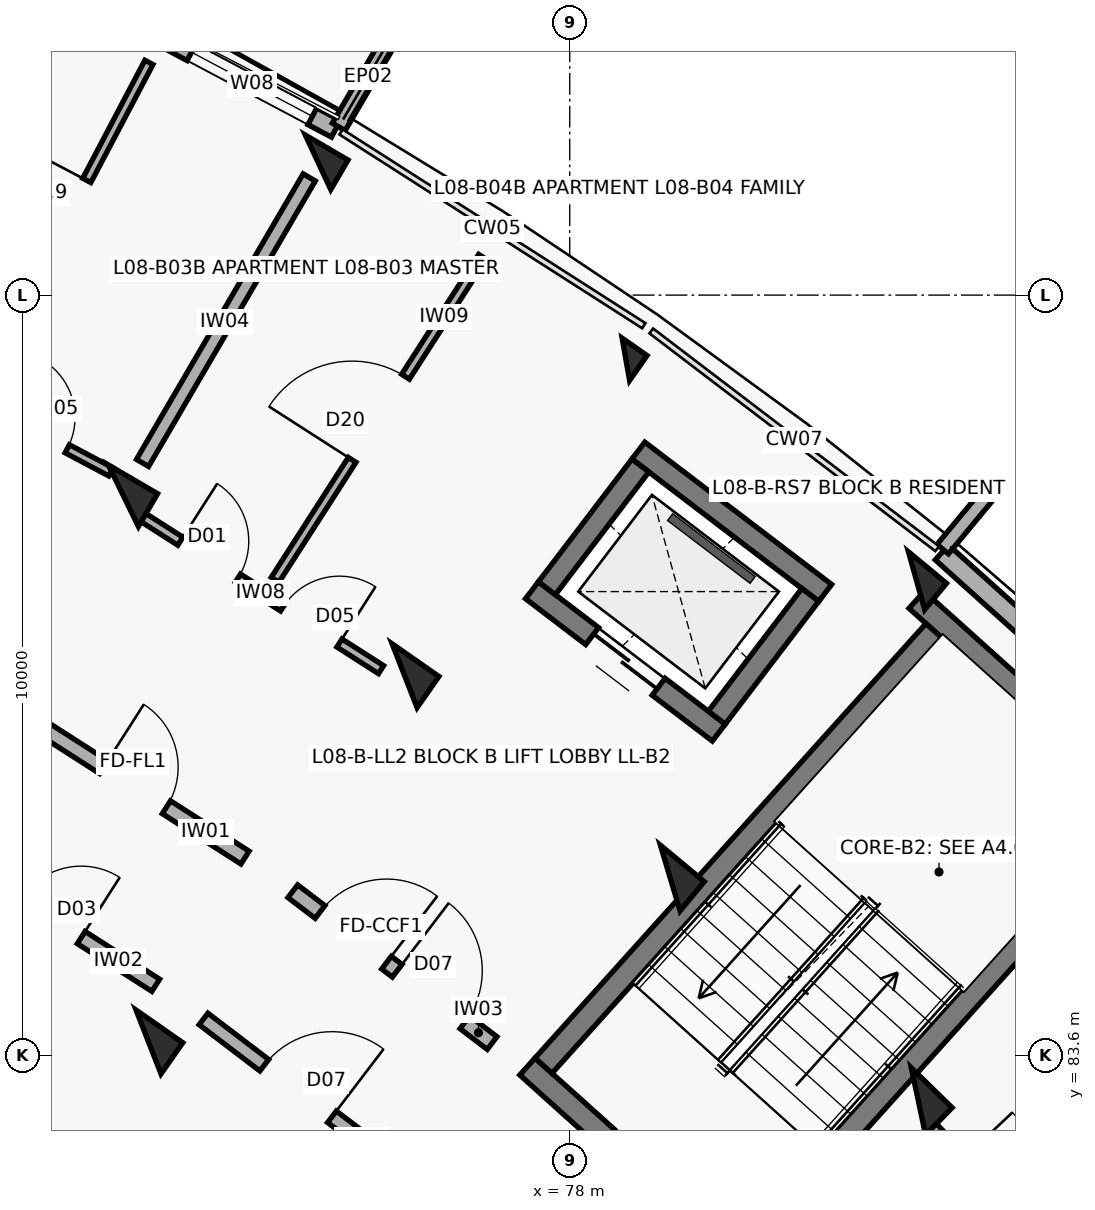
"""IFC4 building model, lengths in metres.
Left out: names, types, materials, properties, quantities, classifications, styles, units other than length and angle.
Written with IfcOpenShell. Run it as: python <this file> out.ifc"""

import sys

from ifc_helpers import new_model, si_unit, direction, frame, frame_2d, origin, origin_2d, place, context, subcontext, project, spatial, rectangle, extrude, element, fill, save


model = new_model("IFC4")
c1 = context("Model", 3, precision=1e-05, world=origin(), true_north=direction((0.0, 1.0)))
c2 = subcontext(c1, "Body", "Model", "MODEL_VIEW")
j1 = project(units=[si_unit("LENGTHUNIT", "METRE"), si_unit("PLANEANGLEUNIT", "RADIAN")], contexts=[c1])
p1 = place(None, origin())
s1 = spatial("IfcSite", under=j1, at=p1, CompositionType="ELEMENT")
p2 = place(p1, origin())
s2 = spatial("IfcBuilding", under=s1, at=p2, CompositionType="ELEMENT")
p3 = place(p2, frame((0.0, 0.0, 26.7)))
s3 = spatial("IfcBuildingStorey", under=s2, at=p3, CompositionType="ELEMENT", Elevation=26.7)
p4 = place(p3, frame((72.127, 90.96, 0.0), z_axis=(0.0, 0.0, 1.0), x_axis=(0.504226211181, 0.863571611366, 0.0)))
e1 = element("IfcColumn", 1, at=p4, inside=s3, PredefinedType="COLUMN", context=c2, shape_type="SweptSolid", body=[
    extrude(rectangle(XDim=0.5, YDim=0.75, at=origin_2d()), origin(), (0.0, 0.0, 1.0), 3.1),
])
p5 = place(p3, frame((74.689, 95.347, 0.0), z_axis=(0.0, 0.0, 1.0), x_axis=(0.504226211181, 0.863571611366, 0.0)))
e2 = element("IfcColumn", 2, at=p5, inside=s3, PredefinedType="COLUMN", context=c2, shape_type="SweptSolid", body=[
    extrude(rectangle(XDim=0.45, YDim=0.65, at=origin_2d()), origin(), (0.0, 0.0, 1.0), 3.1),
])
for number, where, z_axis, x_axis in (
    (3, (72.458, 83.773, 0.0), (0.0, 0.0, 1.0), (0.573, 0.82, 0.0)),
    (4, (75.828, 88.592, 0.0), (0.0, 0.0, 1.0), (0.573, 0.82, 0.0)),
):
    element("IfcColumn", number, at=place(p3, frame(where, z_axis=z_axis, x_axis=x_axis)), inside=s3, PredefinedType="COLUMN", context=c2, shape_type="SweptSolid", body=[
        extrude(rectangle(XDim=0.5, YDim=0.75, at=origin_2d()), origin(), (0.0, 0.0, 1.0), 3.1),
    ])
p6 = place(p3, frame((78.739, 92.755, 0.0), z_axis=(0.0, 0.0, 1.0), x_axis=(0.573004420611, 0.819552276527, 0.0)))
e5 = element("IfcColumn", 5, at=p6, inside=s3, PredefinedType="COLUMN", context=c2, shape_type="SweptSolid", body=[
    extrude(rectangle(XDim=0.4, YDim=0.4, at=origin_2d()), origin(), (0.0, 0.0, 1.0), 3.1),
])
p7 = place(p3, frame((79.322, 85.93, 0.0), z_axis=(0.0, 0.0, 1.0), x_axis=(0.637961754089, 0.770068049148, 0.0)))
e6 = element("IfcColumn", 6, at=p7, inside=s3, PredefinedType="COLUMN", context=c2, shape_type="SweptSolid", body=[
    extrude(rectangle(XDim=0.5, YDim=0.75, at=origin_2d()), origin(), (0.0, 0.0, 1.0), 3.1),
])
p8 = place(p3, frame((82.563, 89.842, 0.0), z_axis=(0.0, 0.0, 1.0), x_axis=(0.637961754089, 0.770068049148, 0.0)))
e7 = element("IfcColumn", 7, at=p8, inside=s3, PredefinedType="COLUMN", context=c2, shape_type="SweptSolid", body=[
    extrude(rectangle(XDim=0.45, YDim=0.65, at=origin_2d()), origin(), (0.0, 0.0, 1.0), 3.1),
])
p9 = place(p3, frame((82.588, 82.991, 0.0), z_axis=(0.0, 0.0, 1.0), x_axis=(0.698665066769, 0.715448897181, 0.0)))
e8 = element("IfcColumn", 8, at=p9, inside=s3, PredefinedType="COLUMN", context=c2, shape_type="SweptSolid", body=[
    extrude(rectangle(XDim=0.5, YDim=0.75, at=origin_2d()), origin(), (0.0, 0.0, 1.0), 3.1),
])
p10 = place(p3, frame((70.675, 98.042, 0.0), z_axis=(0.0, 0.0, 1.0), x_axis=(0.883448093208, -0.468529045639, 0.0)))
e9 = element("IfcWall", 9, at=p10, inside=s3, PredefinedType="SOLIDWALL", context=c2, shape_type="SweptSolid", body=[
    extrude(rectangle(XDim=4.809, YDim=0.248, at=frame_2d((2.405, 0.0))), origin(), (0.0, 0.0, 1.0), 2.25),
])
p11 = place(p10, frame((0.4, 0.0, 0.0)))
e10 = element("IfcOpeningElement", 10, at=p11, cuts=e9, PredefinedType="OPENING", context=c2, shape_type="SweptSolid", body=[
    extrude(rectangle(XDim=1.1, YDim=2.15, at=frame_2d((0.55, 1.075))), frame((0.0, 0.134, 0.0), z_axis=(0.0, -1.0, 0.0), x_axis=(1.0, 0.0, 0.0)), (0.0, 0.0, 1.0), 0.268),
])
p12 = place(p10, frame((2.659, 0.0, 0.35)))
e11 = element("IfcOpeningElement", 11, at=p12, cuts=e9, PredefinedType="OPENING", context=c2, shape_type="SweptSolid", body=[
    extrude(rectangle(XDim=1.8, YDim=1.65, at=frame_2d((0.9, 0.825))), frame((0.0, 0.134, 0.0), z_axis=(0.0, -1.0, 0.0), x_axis=(1.0, 0.0, 0.0)), (0.0, 0.0, 1.0), 0.268),
])
p13 = place(p3, frame((74.961, 95.813, 0.0), z_axis=(0.0, 0.0, 1.0), x_axis=(0.504228145431, 0.863570481985, 0.0)))
e12 = element("IfcWall", 12, at=p13, inside=s3, PredefinedType="PARAPET", context=c2, shape_type="SweptSolid", body=[
    extrude(rectangle(XDim=1.53, YDim=0.195, at=frame_2d((0.765, 0.0))), origin(), (0.0, 0.0, 1.0), 2.25),
])
p14 = place(p3, frame((82.897, 90.213, 0.0), z_axis=(0.0, 0.0, 1.0), x_axis=(0.743387539862, -0.668860946369, 0.0)))
e13 = element("IfcWall", 13, at=p14, inside=s3, PredefinedType="SOLIDWALL", context=c2, shape_type="SweptSolid", body=[
    extrude(rectangle(XDim=4.809, YDim=0.262, at=frame_2d((2.405, 0.0))), origin(), (0.0, 0.0, 1.0), 2.25),
])
p15 = place(p3, frame((82.908, 90.257, 0.0), z_axis=(0.0, 0.0, 1.0), x_axis=(0.637967316825, 0.770063440674, 0.0)))
e14 = element("IfcWall", 14, at=p15, inside=s3, PredefinedType="PARAPET", context=c2, shape_type="SweptSolid", body=[
    extrude(rectangle(XDim=0.9, YDim=0.195, at=frame_2d((0.45, 0.0))), origin(), (0.0, 0.0, 1.0), 2.25),
])
p16 = place(p3, frame((80.32, 80.862, 0.0), z_axis=(0.0, 0.0, 1.0), x_axis=(-0.743375696158, 0.668874109501, 0.0)))
e15 = element("IfcWall", 15, at=p16, inside=s3, PredefinedType="SHEAR", context=c2, shape_type="SweptSolid", body=[
    extrude(rectangle(XDim=3.87, YDim=0.3, at=frame_2d((1.935, 0.0))), origin(), (0.0, 0.0, 1.0), 3.1),
])
p17 = place(p16, frame((1.41, 0.0, 0.0)))
e16 = element("IfcOpeningElement", 16, at=p17, cuts=e15, PredefinedType="OPENING", context=c2, shape_type="SweptSolid", body=[
    extrude(rectangle(XDim=1.05, YDim=2.15, at=frame_2d((0.525, 1.075))), frame((0.0, 0.16, 0.0), z_axis=(0.0, -1.0, 0.0), x_axis=(1.0, 0.0, 0.0)), (0.0, 0.0, 1.0), 0.32),
])
p18 = place(p3, frame((85.887, 86.601, 0.0), z_axis=(0.0, 0.0, 1.0), x_axis=(-0.743400052815, 0.668847038922, 0.0)))
e17 = element("IfcWall", 17, at=p18, inside=s3, PredefinedType="SHEAR", context=c2, shape_type="SweptSolid", body=[
    extrude(rectangle(XDim=4.47, YDim=0.3, at=frame_2d((2.235, 0.0))), origin(), (0.0, 0.0, 1.0), 3.1),
])
p19 = place(p3, frame((80.309, 81.073, 0.0), z_axis=(0.0, 0.0, 1.0), x_axis=(0.668885797871, 0.743365179038, 0.0)))
e18 = element("IfcWall", 18, at=p19, inside=s3, PredefinedType="SHEAR", context=c2, shape_type="SweptSolid", body=[
    extrude(rectangle(XDim=7.69, YDim=0.3, at=frame_2d((3.845, 0.0))), origin(), (0.0, 0.0, 1.0), 3.1),
])
p20 = place(p3, frame((77.655, 83.461, 0.0), z_axis=(0.0, 0.0, 1.0), x_axis=(0.668868253964, 0.743380964808, 0.0)))
e19 = element("IfcWall", 19, at=p20, inside=s3, PredefinedType="SHEAR", context=c2, shape_type="SweptSolid", body=[
    extrude(rectangle(XDim=7.69, YDim=0.3, at=frame_2d((3.845, 0.0))), origin(), (0.0, 0.0, 1.0), 3.1),
])
p21 = place(p3, frame((79.961, 87.844, 0.0), z_axis=(0.0, 0.0, 1.0), x_axis=(-0.795464365424, 0.606000365793, 0.0)))
e20 = element("IfcWall", 20, at=p21, inside=s3, PredefinedType="SHEAR", context=c2, shape_type="SweptSolid", body=[
    extrude(rectangle(XDim=3.09, YDim=0.28, at=frame_2d((1.545, 0.0))), origin(), (0.0, 0.0, 1.0), 3.1),
])
p22 = place(p21, frame((0.995, 0.0, 0.0)))
e21 = element("IfcOpeningElement", 21, at=p22, cuts=e20, PredefinedType="OPENING", context=c2, shape_type="SweptSolid", body=[
    extrude(rectangle(XDim=1.1, YDim=2.15, at=frame_2d((0.55, 1.075))), frame((0.0, 0.15, 0.0), z_axis=(0.0, -1.0, 0.0), x_axis=(1.0, 0.0, 0.0)), (0.0, 0.0, 1.0), 0.3),
])
p23 = place(p3, frame((81.361, 89.681, 0.0), z_axis=(0.0, 0.0, 1.0), x_axis=(-0.795502452183, 0.605950368076, 0.0)))
e22 = element("IfcWall", 22, at=p23, inside=s3, PredefinedType="SHEAR", context=c2, shape_type="SweptSolid", body=[
    extrude(rectangle(XDim=3.09, YDim=0.28, at=frame_2d((1.545, 0.0))), origin(), (0.0, 0.0, 1.0), 3.1),
])
for number, where, z_axis, x_axis in (
    (23, (79.935, 88.04, 0.0), (0.0, 0.0, 1.0), (0.606, 0.795, 0.0)),
    (24, (77.699, 89.743, 0.0), (0.0, 0.0, 1.0), (0.606, 0.795, 0.0)),
):
    element("IfcWall", number, at=place(p3, frame(where, z_axis=z_axis, x_axis=x_axis)), inside=s3, PredefinedType="SHEAR", context=c2, shape_type="SweptSolid", body=[
        extrude(rectangle(XDim=2.03, YDim=0.28, at=frame_2d((1.015, 0.0))), origin(), (0.0, 0.0, 1.0), 3.1),
    ])
p24 = place(p3, frame((68.598, 93.058, 0.0), z_axis=(0.0, 0.0, 1.0), x_axis=(0.883441603894, -0.468541281543, 0.0)))
e25 = element("IfcWall", 25, at=p24, inside=s3, PredefinedType="PARTITIONING", context=c2, shape_type="SweptSolid", body=[
    extrude(rectangle(XDim=3.81, YDim=0.12, at=frame_2d((1.905, 0.0))), origin(), (0.0, 0.0, 1.0), 2.08),
])
p25 = place(p24, frame((0.65, 0.0, 0.0)))
e26 = element("IfcOpeningElement", 26, at=p25, cuts=e25, PredefinedType="OPENING", context=c2, shape_type="SweptSolid", body=[
    extrude(rectangle(XDim=0.9, YDim=2.1, at=frame_2d((0.45, 1.05))), frame((0.0, 0.07, 0.0), z_axis=(0.0, -1.0, 0.0), x_axis=(1.0, 0.0, 0.0)), (0.0, 0.0, 1.0), 0.14),
])
p26 = place(p24, frame((2.28, 0.0, 0.0)))
e27 = element("IfcOpeningElement", 27, at=p26, cuts=e25, PredefinedType="OPENING", context=c2, shape_type="SweptSolid", body=[
    extrude(rectangle(XDim=0.88, YDim=2.1, at=frame_2d((0.44, 1.05))), frame((0.0, 0.07, 0.0), z_axis=(0.0, -1.0, 0.0), x_axis=(1.0, 0.0, 0.0)), (0.0, 0.0, 1.0), 0.14),
])
p27 = place(p3, frame((70.251, 92.459, 0.0), z_axis=(0.0, 0.0, 1.0), x_axis=(0.465865054936, 0.884855779542, 0.0)))
e28 = element("IfcWall", 28, at=p27, inside=s3, PredefinedType="PARTITIONING", context=c2, shape_type="SweptSolid", body=[
    extrude(rectangle(XDim=4.75, YDim=0.12, at=frame_2d((2.375, 0.0))), origin(), (0.0, 0.0, 1.0), 2.08),
])
p28 = place(p27, frame((1.755, 0.0, 0.0)))
e29 = element("IfcOpeningElement", 29, at=p28, cuts=e28, PredefinedType="OPENING", context=c2, shape_type="SweptSolid", body=[
    extrude(rectangle(XDim=1.24, YDim=2.1, at=frame_2d((0.62, 1.05))), frame((0.0, 0.07, 0.0), z_axis=(0.0, -1.0, 0.0), x_axis=(1.0, 0.0, 0.0)), (0.0, 0.0, 1.0), 0.14),
])
p29 = place(p3, frame((70.834, 88.051, 0.0), z_axis=(0.0, 0.0, 1.0), x_axis=(0.842257205985, -0.539075874963, 0.0)))
e30 = element("IfcWall", 30, at=p29, inside=s3, PredefinedType="SOLIDWALL", context=c2, shape_type="SweptSolid", body=[
    extrude(rectangle(XDim=3.436, YDim=0.2, at=frame_2d((1.718, 0.0))), origin(), (0.0, 0.0, 1.0), 2.08),
])
p30 = place(p29, frame((1.228, 0.0, 0.0)))
e31 = element("IfcOpeningElement", 31, at=p30, cuts=e30, PredefinedType="OPENING", context=c2, shape_type="SweptSolid", body=[
    extrude(rectangle(XDim=0.98, YDim=2.15, at=frame_2d((0.49, 1.075))), frame((0.0, 0.11, 0.0), z_axis=(0.0, -1.0, 0.0), x_axis=(1.0, 0.0, 0.0)), (0.0, 0.0, 1.0), 0.22),
])
p31 = place(p3, frame((69.8, 86.281, 0.0), z_axis=(0.0, 0.0, 1.0), x_axis=(0.842225276846, -0.539125758095, 0.0)))
e32 = element("IfcWall", 32, at=p31, inside=s3, PredefinedType="SOLIDWALL", context=c2, shape_type="SweptSolid", body=[
    extrude(rectangle(XDim=3.269, YDim=0.19, at=frame_2d((1.634, 0.0))), origin(), (0.0, 0.0, 1.0), 2.08),
])
p32 = place(p31, frame((1.164, 0.0, 0.0)))
e33 = element("IfcOpeningElement", 33, at=p32, cuts=e32, PredefinedType="OPENING", context=c2, shape_type="SweptSolid", body=[
    extrude(rectangle(XDim=0.94, YDim=2.1, at=frame_2d((0.47, 1.05))), frame((0.0, 0.105, 0.0), z_axis=(0.0, -1.0, 0.0), x_axis=(1.0, 0.0, 0.0)), (0.0, 0.0, 1.0), 0.21),
])
p33 = place(p3, frame((72.33, 90.712, 0.0), z_axis=(0.0, 0.0, 1.0), x_axis=(0.842245628842, -0.539093962771, 0.0)))
e34 = element("IfcWall", 34, at=p33, inside=s3, PredefinedType="PARTITIONING", context=c2, shape_type="SweptSolid", body=[
    extrude(rectangle(XDim=3.785, YDim=0.125, at=frame_2d((1.893, 0.0))), origin(), (0.0, 0.0, 1.0), 2.08),
])
p34 = place(p33, frame((0.65, 0.0, 0.0)))
e35 = element("IfcOpeningElement", 35, at=p34, cuts=e34, PredefinedType="OPENING", context=c2, shape_type="SweptSolid", body=[
    extrude(rectangle(XDim=0.9, YDim=2.1, at=frame_2d((0.45, 1.05))), frame((0.0, 0.073, 0.0), z_axis=(0.0, -1.0, 0.0), x_axis=(1.0, 0.0, 0.0)), (0.0, 0.0, 1.0), 0.145),
])
p35 = place(p33, frame((2.255, 0.0, 0.0)))
e36 = element("IfcOpeningElement", 36, at=p35, cuts=e34, PredefinedType="OPENING", context=c2, shape_type="SweptSolid", body=[
    extrude(rectangle(XDim=0.88, YDim=2.1, at=frame_2d((0.44, 1.05))), frame((0.0, 0.073, 0.0), z_axis=(0.0, -1.0, 0.0), x_axis=(1.0, 0.0, 0.0)), (0.0, 0.0, 1.0), 0.145),
])
p36 = place(p3, frame((74.124, 89.854, 0.0), z_axis=(0.0, 0.0, 1.0), x_axis=(0.5403494769, 0.84144069477, 0.0)))
e37 = element("IfcWall", 37, at=p36, inside=s3, PredefinedType="PARTITIONING", context=c2, shape_type="SweptSolid", body=[
    extrude(rectangle(XDim=5.05, YDim=0.12, at=frame_2d((2.525, 0.0))), origin(), (0.0, 0.0, 1.0), 2.08),
])
p37 = place(p36, frame((1.875, 0.0, 0.0)))
e38 = element("IfcOpeningElement", 38, at=p37, cuts=e37, PredefinedType="OPENING", context=c2, shape_type="SweptSolid", body=[
    extrude(rectangle(XDim=1.3, YDim=2.1, at=frame_2d((0.65, 1.05))), frame((0.0, 0.07, 0.0), z_axis=(0.0, -1.0, 0.0), x_axis=(1.0, 0.0, 0.0)), (0.0, 0.0, 1.0), 0.14),
])
p38 = place(p3, frame((72.379, 91.392, 0.0), z_axis=(0.0, 0.0, 1.0), x_axis=(0.504216452091, 0.863577309475, 0.0)))
e39 = element("IfcWall", 39, at=p38, inside=s3, PredefinedType="SOLIDWALL", context=c2, shape_type="SweptSolid", body=[
    extrude(rectangle(XDim=4.35, YDim=0.185, at=frame_2d((2.175, 0.0))), origin(), (0.0, 0.0, 1.0), 2.08),
])
p39 = place(p3, frame((74.357, 85.756, 0.0), z_axis=(0.0, 0.0, 1.0), x_axis=(0.795498026433, -0.605956178235, 0.0)))
e40 = element("IfcWall", 40, at=p39, inside=s3, PredefinedType="SOLIDWALL", context=c2, shape_type="SweptSolid", body=[
    extrude(rectangle(XDim=3.296, YDim=0.21, at=frame_2d((1.648, 0.0))), origin(), (0.0, 0.0, 1.0), 2.08),
])
p40 = place(p39, frame((0.45, 0.0, 0.0)))
e41 = element("IfcOpeningElement", 41, at=p40, cuts=e40, PredefinedType="OPENING", context=c2, shape_type="SweptSolid", body=[
    extrude(rectangle(XDim=1.1, YDim=2.15, at=frame_2d((0.55, 1.075))), frame((0.0, 0.115, 0.0), z_axis=(0.0, -1.0, 0.0), x_axis=(1.0, 0.0, 0.0)), (0.0, 0.0, 1.0), 0.23),
])
p41 = place(p39, frame((1.726, 0.0, 0.0)))
e42 = element("IfcOpeningElement", 42, at=p41, cuts=e40, PredefinedType="OPENING", context=c2, shape_type="SweptSolid", body=[
    extrude(rectangle(XDim=1.12, YDim=2.15, at=frame_2d((0.56, 1.075))), frame((0.0, 0.115, 0.0), z_axis=(0.0, -1.0, 0.0), x_axis=(1.0, 0.0, 0.0)), (0.0, 0.0, 1.0), 0.23),
])
p42 = place(p3, frame((73.182, 84.076, 0.0), z_axis=(0.0, 0.0, 1.0), x_axis=(0.795501577908, -0.605951515838, 0.0)))
e43 = element("IfcWall", 43, at=p42, inside=s3, PredefinedType="SOLIDWALL", context=c2, shape_type="SweptSolid", body=[
    extrude(rectangle(XDim=3.129, YDim=0.19, at=frame_2d((1.564, 0.0))), origin(), (0.0, 0.0, 1.0), 2.08),
])
p43 = place(p42, frame((1.004, 0.0, 0.0)))
e44 = element("IfcOpeningElement", 44, at=p43, cuts=e43, PredefinedType="OPENING", context=c2, shape_type="SweptSolid", body=[
    extrude(rectangle(XDim=1.12, YDim=2.15, at=frame_2d((0.56, 1.075))), frame((0.0, 0.105, 0.0), z_axis=(0.0, -1.0, 0.0), x_axis=(1.0, 0.0, 0.0)), (0.0, 0.0, 1.0), 0.21),
])
p44 = place(p3, frame((82.724, 82.701, 0.0), z_axis=(0.0, 0.0, 1.0), x_axis=(0.686331812627, -0.72728855551, 0.0)))
e45 = element("IfcWall", 45, at=p44, inside=s3, PredefinedType="PARTITIONING", context=c2, shape_type="SweptSolid", body=[
    extrude(rectangle(XDim=3.785, YDim=0.14, at=frame_2d((1.893, 0.0))), origin(), (0.0, 0.0, 1.0), 2.08),
])
p45 = place(p44, frame((0.65, 0.0, 0.0)))
e46 = element("IfcOpeningElement", 46, at=p45, cuts=e45, PredefinedType="OPENING", context=c2, shape_type="SweptSolid", body=[
    extrude(rectangle(XDim=0.9, YDim=2.1, at=frame_2d((0.45, 1.05))), frame((0.0, 0.08, 0.0), z_axis=(0.0, -1.0, 0.0), x_axis=(1.0, 0.0, 0.0)), (0.0, 0.0, 1.0), 0.16),
])
p46 = place(p44, frame((2.255, 0.0, 0.0)))
e47 = element("IfcOpeningElement", 47, at=p46, cuts=e45, PredefinedType="OPENING", context=c2, shape_type="SweptSolid", body=[
    extrude(rectangle(XDim=0.88, YDim=2.1, at=frame_2d((0.44, 1.05))), frame((0.0, 0.08, 0.0), z_axis=(0.0, -1.0, 0.0), x_axis=(1.0, 0.0, 0.0)), (0.0, 0.0, 1.0), 0.16),
])
p47 = place(p12, origin())
e48 = element("IfcWindow", 48, at=p47, inside=s3, PartitioningType="TRIPLE_PANEL_VERTICAL", PredefinedType="WINDOW", context=c2, shape_type="SweptSolid", body=[
    extrude(rectangle(XDim=1.8, YDim=1.65, at=frame_2d((0.9, 0.825))), frame((0.0, 0.03, 0.0), z_axis=(0.0, -1.0, 0.0), x_axis=(1.0, 0.0, 0.0)), (0.0, 0.0, 1.0), 0.06),
])
fill(e11, e48)
p48 = place(p22, origin())
e49 = element("IfcDoor", 49, at=p48, inside=s3, OperationType="DOUBLE_DOOR_SLIDING", PredefinedType="DOOR", context=c2, shape_type="SweptSolid", body=[
    extrude(rectangle(XDim=1.1, YDim=2.15, at=frame_2d((0.55, 1.075))), frame((0.0, 0.025, 0.0), z_axis=(0.0, -1.0, 0.0), x_axis=(1.0, 0.0, 0.0)), (0.0, 0.0, 1.0), 0.05),
])
fill(e21, e49)
p49 = place(p26, origin())
e50 = element("IfcDoor", 50, at=p49, inside=s3, OperationType="SINGLE_SWING_LEFT", PredefinedType="DOOR", context=c2, shape_type="SweptSolid", body=[
    extrude(rectangle(XDim=0.88, YDim=2.1, at=frame_2d((0.44, 1.05))), frame((0.0, 0.025, 0.0), z_axis=(0.0, -1.0, 0.0), x_axis=(1.0, 0.0, 0.0)), (0.0, 0.0, 1.0), 0.05),
])
fill(e27, e50)
p50 = place(p28, origin())
e51 = element("IfcDoor", 51, at=p50, inside=s3, OperationType="SINGLE_SWING_RIGHT", PredefinedType="DOOR", context=c2, shape_type="SweptSolid", body=[
    extrude(rectangle(XDim=1.24, YDim=2.1, at=frame_2d((0.62, 1.05))), frame((0.0, 0.025, 0.0), z_axis=(0.0, -1.0, 0.0), x_axis=(1.0, 0.0, 0.0)), (0.0, 0.0, 1.0), 0.05),
])
fill(e29, e51)
p51 = place(p30, origin())
e52 = element("IfcDoor", 52, at=p51, inside=s3, OperationType="SINGLE_SWING_LEFT", PredefinedType="DOOR", context=c2, shape_type="SweptSolid", body=[
    extrude(rectangle(XDim=0.98, YDim=2.15, at=frame_2d((0.49, 1.075))), frame((0.0, 0.025, 0.0), z_axis=(0.0, -1.0, 0.0), x_axis=(1.0, 0.0, 0.0)), (0.0, 0.0, 1.0), 0.05),
])
fill(e31, e52)
p52 = place(p32, origin())
e53 = element("IfcDoor", 53, at=p52, inside=s3, OperationType="SINGLE_SWING_RIGHT", PredefinedType="DOOR", context=c2, shape_type="SweptSolid", body=[
    extrude(rectangle(XDim=0.94, YDim=2.1, at=frame_2d((0.47, 1.05))), frame((0.0, 0.025, 0.0), z_axis=(0.0, -1.0, 0.0), x_axis=(1.0, 0.0, 0.0)), (0.0, 0.0, 1.0), 0.05),
])
fill(e33, e53)
p53 = place(p34, origin())
e54 = element("IfcDoor", 54, at=p53, inside=s3, OperationType="SINGLE_SWING_LEFT", PredefinedType="DOOR", context=c2, shape_type="SweptSolid", body=[
    extrude(rectangle(XDim=0.9, YDim=2.1, at=frame_2d((0.45, 1.05))), frame((0.0, 0.025, 0.0), z_axis=(0.0, -1.0, 0.0), x_axis=(1.0, 0.0, 0.0)), (0.0, 0.0, 1.0), 0.05),
])
fill(e35, e54)
p54 = place(p35, origin())
e55 = element("IfcDoor", 55, at=p54, inside=s3, OperationType="SINGLE_SWING_RIGHT", PredefinedType="DOOR", context=c2, shape_type="SweptSolid", body=[
    extrude(rectangle(XDim=0.88, YDim=2.1, at=frame_2d((0.44, 1.05))), frame((0.0, 0.025, 0.0), z_axis=(0.0, -1.0, 0.0), x_axis=(1.0, 0.0, 0.0)), (0.0, 0.0, 1.0), 0.05),
])
fill(e36, e55)
p55 = place(p37, origin())
e56 = element("IfcDoor", 56, at=p55, inside=s3, OperationType="SINGLE_SWING_LEFT", PredefinedType="DOOR", context=c2, shape_type="SweptSolid", body=[
    extrude(rectangle(XDim=1.3, YDim=2.1, at=frame_2d((0.65, 1.05))), frame((0.0, 0.025, 0.0), z_axis=(0.0, -1.0, 0.0), x_axis=(1.0, 0.0, 0.0)), (0.0, 0.0, 1.0), 0.05),
])
fill(e38, e56)
p56 = place(p40, origin())
e57 = element("IfcDoor", 57, at=p56, inside=s3, OperationType="SINGLE_SWING_RIGHT", PredefinedType="DOOR", context=c2, shape_type="SweptSolid", body=[
    extrude(rectangle(XDim=1.1, YDim=2.15, at=frame_2d((0.55, 1.075))), frame((0.0, 0.025, 0.0), z_axis=(0.0, -1.0, 0.0), x_axis=(1.0, 0.0, 0.0)), (0.0, 0.0, 1.0), 0.05),
])
fill(e41, e57)
p57 = place(p41, origin())
e58 = element("IfcDoor", 58, at=p57, inside=s3, OperationType="SINGLE_SWING_LEFT", PredefinedType="DOOR", context=c2, shape_type="SweptSolid", body=[
    extrude(rectangle(XDim=1.12, YDim=2.15, at=frame_2d((0.56, 1.075))), frame((0.0, 0.025, 0.0), z_axis=(0.0, -1.0, 0.0), x_axis=(1.0, 0.0, 0.0)), (0.0, 0.0, 1.0), 0.05),
])
fill(e42, e58)
p58 = place(p43, origin())
e59 = element("IfcDoor", 59, at=p58, inside=s3, OperationType="SINGLE_SWING_RIGHT", PredefinedType="DOOR", context=c2, shape_type="SweptSolid", body=[
    extrude(rectangle(XDim=1.12, YDim=2.15, at=frame_2d((0.56, 1.075))), frame((0.0, 0.025, 0.0), z_axis=(0.0, -1.0, 0.0), x_axis=(1.0, 0.0, 0.0)), (0.0, 0.0, 1.0), 0.05),
])
fill(e44, e59)
save(model, sys.argv[1])
